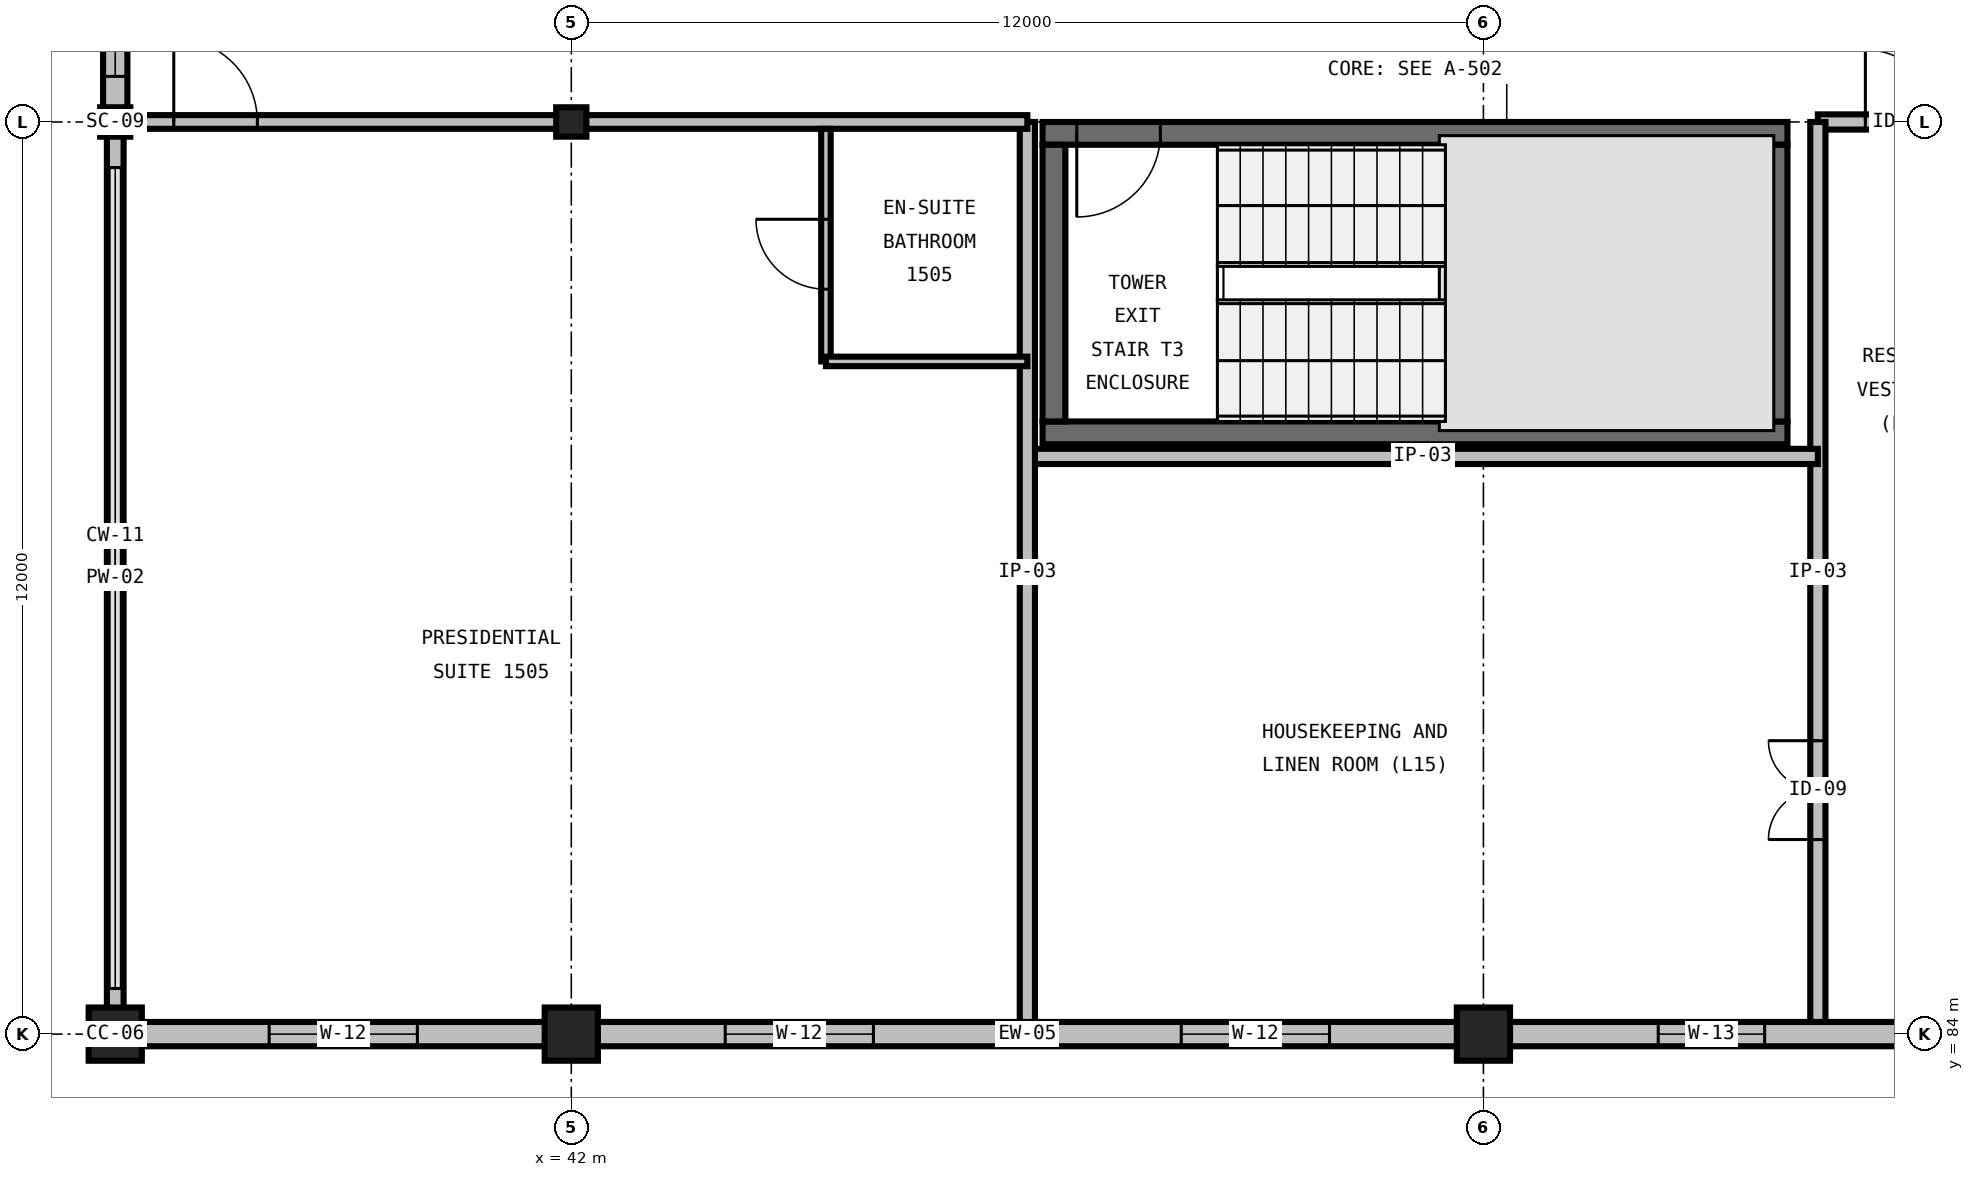
"""IFC4 building model, lengths in metres.
Left out: names, types, materials, properties, quantities, classifications, styles, units other than length and angle.
Written with IfcOpenShell. Run it as: python <this file> out.ifc"""

import sys

from ifc_helpers import new_model, si_unit, direction, frame, frame_2d, origin, origin_2d, place, context, subcontext, project, spatial, rectangle, i_section, extrude, element, fill, save


model = new_model("IFC4")
c1 = context("Model", 3, precision=1e-05, world=origin(), true_north=direction((0.0, 1.0)))
c2 = subcontext(c1, "Body", "Model", "MODEL_VIEW")
j1 = project(units=[si_unit("LENGTHUNIT", "METRE"), si_unit("PLANEANGLEUNIT", "RADIAN")], contexts=[c1])
p1 = place(None, origin())
s1 = spatial("IfcSite", under=j1, at=p1, CompositionType="ELEMENT")
p2 = place(p1, origin())
s2 = spatial("IfcBuilding", under=s1, at=p2, CompositionType="ELEMENT")
p3 = place(p2, frame((0.0, 0.0, 63.6)))
s3 = spatial("IfcBuildingStorey", under=s2, at=p3, CompositionType="ELEMENT", Elevation=63.6)
p4 = place(p3, frame((36.0, 84.0, 0.0), z_axis=(0.0, 0.0, 1.0), x_axis=(1.0, 0.0, 0.0)))
e1 = element("IfcColumn", 1, at=p4, inside=s3, PredefinedType="COLUMN", context=c2, shape_type="SweptSolid", body=[
    extrude(rectangle(XDim=0.7, YDim=0.7, at=origin_2d()), origin(), (0.0, 0.0, 1.0), 3.6),
])
p5 = place(p3, frame((36.0, 96.0, 0.0), z_axis=(0.0, 0.0, 1.0), x_axis=(1.0, 0.0, 0.0)))
e2 = element("IfcColumn", 2, at=p5, inside=s3, PredefinedType="COLUMN", context=c2, shape_type="SweptSolid", body=[
    extrude(i_section(OverallWidth=0.398, OverallDepth=0.387, WebThickness=0.021, FlangeThickness=0.033, FilletRadius=0.031, at=origin_2d()), origin(), (0.0, 0.0, 1.0), 3.6),
])
p6 = place(p3, frame((42.0, 84.0, 0.0), z_axis=(0.0, 0.0, 1.0), x_axis=(1.0, 0.0, 0.0)))
e3 = element("IfcColumn", 3, at=p6, inside=s3, PredefinedType="COLUMN", context=c2, shape_type="SweptSolid", body=[
    extrude(rectangle(XDim=0.7, YDim=0.7, at=origin_2d()), origin(), (0.0, 0.0, 1.0), 3.6),
])
p7 = place(p3, frame((42.0, 96.0, 0.0), z_axis=(0.0, 0.0, 1.0), x_axis=(1.0, 0.0, 0.0)))
e4 = element("IfcColumn", 4, at=p7, inside=s3, PredefinedType="COLUMN", context=c2, shape_type="SweptSolid", body=[
    extrude(i_section(OverallWidth=0.398, OverallDepth=0.387, WebThickness=0.021, FlangeThickness=0.033, FilletRadius=0.031, at=origin_2d()), origin(), (0.0, 0.0, 1.0), 3.6),
])
p8 = place(p3, frame((54.0, 84.0, 0.0), z_axis=(0.0, 0.0, 1.0), x_axis=(1.0, 0.0, 0.0)))
e5 = element("IfcColumn", 5, at=p8, inside=s3, PredefinedType="COLUMN", context=c2, shape_type="SweptSolid", body=[
    extrude(rectangle(XDim=0.7, YDim=0.7, at=origin_2d()), origin(), (0.0, 0.0, 1.0), 3.6),
])
p9 = place(p3, frame((48.2, 91.91, 0.0), z_axis=(0.0, 0.0, 1.0), x_axis=(1.0, 0.0, 0.0)))
e6 = element("IfcWall", 6, at=p9, inside=s3, PredefinedType="SHEAR", context=c2, shape_type="SweptSolid", body=[
    extrude(rectangle(XDim=9.8, YDim=0.3, at=frame_2d((4.9, 0.0))), origin(), (0.0, 0.0, 1.0), 3.6),
])
p10 = place(p3, frame((58.0, 95.85, 0.0), z_axis=(0.0, 0.0, 1.0), x_axis=(-1.0, 0.0, 0.0)))
e7 = element("IfcWall", 7, at=p10, inside=s3, PredefinedType="SHEAR", context=c2, shape_type="SweptSolid", body=[
    extrude(rectangle(XDim=9.8, YDim=0.3, at=frame_2d((4.9, 0.0))), origin(), (0.0, 0.0, 1.0), 3.6),
])
p11 = place(p10, frame((8.25, 0.0, 0.0)))
e8 = element("IfcOpeningElement", 8, at=p11, cuts=e7, PredefinedType="OPENING", context=c2, shape_type="SweptSolid", body=[
    extrude(rectangle(XDim=1.1, YDim=2.2, at=frame_2d((0.55, 1.1))), frame((0.0, 0.165, 0.0), z_axis=(0.0, -1.0, 0.0), x_axis=(1.0, 0.0, 0.0)), (0.0, 0.0, 1.0), 0.33),
])
for number, where, z_axis, x_axis in (
    (9, (48.35, 95.7, 0.0), (0.0, 0.0, 1.0), (0.0, -1.0, 0.0)),
    (10, (57.85, 92.06, 0.0), (0.0, 0.0, 1.0), (0.0, 1.0, 0.0)),
):
    element("IfcWall", number, at=place(p3, frame(where, z_axis=z_axis, x_axis=x_axis)), inside=s3, PredefinedType="SHEAR", context=c2, shape_type="SweptSolid", body=[
        extrude(rectangle(XDim=3.64, YDim=0.3, at=frame_2d((1.82, 0.0))), origin(), (0.0, 0.0, 1.0), 3.6),
    ])
p12 = place(p3, frame((36.0, 84.0, 0.0), z_axis=(0.0, 0.0, 1.0), x_axis=(1.0, 0.0, 0.0)))
e11 = element("IfcWall", 11, at=p12, inside=s3, PredefinedType="STANDARD", context=c2, shape_type="SweptSolid", body=[
    extrude(rectangle(XDim=6.0, YDim=0.32, at=frame_2d((3.0, 0.0))), origin(), (0.0, 0.0, 1.0), 2.536),
])
p13 = place(p12, frame((2.025, 0.0, 0.65)))
e12 = element("IfcOpeningElement", 12, at=p13, cuts=e11, PredefinedType="OPENING", context=c2, shape_type="SweptSolid", body=[
    extrude(rectangle(XDim=1.95, YDim=1.55, at=frame_2d((0.975, 0.775))), frame((0.0, 0.175, 0.0), z_axis=(0.0, -1.0, 0.0), x_axis=(1.0, 0.0, 0.0)), (0.0, 0.0, 1.0), 0.35),
])
p14 = place(p3, frame((42.0, 84.0, 0.0), z_axis=(0.0, 0.0, 1.0), x_axis=(1.0, 0.0, 0.0)))
e13 = element("IfcWall", 13, at=p14, inside=s3, PredefinedType="STANDARD", context=c2, shape_type="SweptSolid", body=[
    extrude(rectangle(XDim=12.0, YDim=0.32, at=frame_2d((6.0, 0.0))), origin(), (0.0, 0.0, 1.0), 2.536),
])
p15 = place(p14, frame((2.025, 0.0, 0.65)))
e14 = element("IfcOpeningElement", 14, at=p15, cuts=e13, PredefinedType="OPENING", context=c2, shape_type="SweptSolid", body=[
    extrude(rectangle(XDim=1.95, YDim=1.55, at=frame_2d((0.975, 0.775))), frame((0.0, 0.175, 0.0), z_axis=(0.0, -1.0, 0.0), x_axis=(1.0, 0.0, 0.0)), (0.0, 0.0, 1.0), 0.35),
])
p16 = place(p14, frame((8.025, 0.0, 0.65)))
e15 = element("IfcOpeningElement", 15, at=p16, cuts=e13, PredefinedType="OPENING", context=c2, shape_type="SweptSolid", body=[
    extrude(rectangle(XDim=1.95, YDim=1.55, at=frame_2d((0.975, 0.775))), frame((0.0, 0.175, 0.0), z_axis=(0.0, -1.0, 0.0), x_axis=(1.0, 0.0, 0.0)), (0.0, 0.0, 1.0), 0.35),
])
p17 = place(p3, frame((54.0, 84.0, 0.0), z_axis=(0.0, 0.0, 1.0), x_axis=(1.0, 0.0, 0.0)))
e16 = element("IfcWall", 16, at=p17, inside=s3, PredefinedType="STANDARD", context=c2, shape_type="SweptSolid", body=[
    extrude(rectangle(XDim=12.0, YDim=0.32, at=frame_2d((6.0, 0.0))), origin(), (0.0, 0.0, 1.0), 2.536),
])
p18 = place(p17, frame((2.3, 0.0, 1.0)))
e17 = element("IfcOpeningElement", 17, at=p18, cuts=e16, PredefinedType="OPENING", context=c2, shape_type="SweptSolid", body=[
    extrude(rectangle(XDim=1.4, YDim=1.4, at=frame_2d((0.7, 0.7))), frame((0.0, 0.175, 0.0), z_axis=(0.0, -1.0, 0.0), x_axis=(1.0, 0.0, 0.0)), (0.0, 0.0, 1.0), 0.35),
])
p19 = place(p17, frame((8.25, 0.0, 1.0)))
e18 = element("IfcOpeningElement", 18, at=p19, cuts=e16, PredefinedType="OPENING", context=c2, shape_type="SweptSolid", body=[
    extrude(rectangle(XDim=1.5, YDim=1.35, at=frame_2d((0.75, 0.675))), frame((0.0, 0.175, 0.0), z_axis=(0.0, -1.0, 0.0), x_axis=(1.0, 0.0, 0.0)), (0.0, 0.0, 1.0), 0.35),
])
p20 = place(p3, frame((36.0, 96.0, 0.0), z_axis=(0.0, 0.0, 1.0), x_axis=(0.0, -1.0, 0.0)))
e19 = element("IfcWall", 19, at=p20, inside=s3, PredefinedType="PARAPET", context=c2, shape_type="SweptSolid", body=[
    extrude(rectangle(XDim=12.0, YDim=0.22, at=frame_2d((6.0, 0.0))), origin(), (0.0, 0.0, 1.0), 0.2),
])
p21 = place(p3, frame((36.0, 105.0, 0.0), z_axis=(0.0, 0.0, 1.0), x_axis=(0.0, -1.0, 0.0)))
e20 = element("IfcWall", 20, at=p21, inside=s3, PredefinedType="STANDARD", context=c2, shape_type="SweptSolid", body=[
    extrude(rectangle(XDim=9.0, YDim=0.32, at=frame_2d((4.5, 0.0))), origin(), (0.0, 0.0, 1.0), 2.981),
])
p22 = place(p21, frame((6.6, 0.0, 0.85)))
e21 = element("IfcOpeningElement", 21, at=p22, cuts=e20, PredefinedType="OPENING", context=c2, shape_type="SweptSolid", body=[
    extrude(rectangle(XDim=1.8, YDim=1.5, at=frame_2d((0.9, 0.75))), frame((0.0, 0.175, 0.0), z_axis=(0.0, -1.0, 0.0), x_axis=(1.0, 0.0, 0.0)), (0.0, 0.0, 1.0), 0.35),
])
p23 = place(p3, frame((58.4, 96.0, 0.0), z_axis=(0.0, 0.0, 1.0), x_axis=(1.0, 0.0, 0.0)))
e22 = element("IfcWall", 22, at=p23, inside=s3, PredefinedType="PARTITIONING", context=c2, shape_type="SweptSolid", body=[
    extrude(rectangle(XDim=2.4, YDim=0.2, at=frame_2d((1.2, 0.0))), origin(), (0.0, 0.0, 1.0), 2.359),
])
p24 = place(p23, frame((0.625, 0.0, 0.0)))
e23 = element("IfcOpeningElement", 23, at=p24, cuts=e22, PredefinedType="OPENING", context=c2, shape_type="SweptSolid", body=[
    extrude(rectangle(XDim=0.95, YDim=2.15, at=frame_2d((0.475, 1.075))), frame((0.0, 0.115, 0.0), z_axis=(0.0, -1.0, 0.0), x_axis=(1.0, 0.0, 0.0)), (0.0, 0.0, 1.0), 0.23),
])
p25 = place(p3, frame((58.4, 84.16, 0.0), z_axis=(0.0, 0.0, 1.0), x_axis=(0.0, 1.0, 0.0)))
e24 = element("IfcWall", 24, at=p25, inside=s3, PredefinedType="PARTITIONING", context=c2, shape_type="SweptSolid", body=[
    extrude(rectangle(XDim=11.84, YDim=0.2, at=frame_2d((5.92, 0.0))), origin(), (0.0, 0.0, 1.0), 3.29),
])
p26 = place(p25, frame((2.4, 0.0, 0.0)))
e25 = element("IfcOpeningElement", 25, at=p26, cuts=e24, PredefinedType="OPENING", context=c2, shape_type="SweptSolid", body=[
    extrude(rectangle(XDim=1.3, YDim=2.2, at=frame_2d((0.65, 1.1))), frame((0.0, 0.115, 0.0), z_axis=(0.0, -1.0, 0.0), x_axis=(1.0, 0.0, 0.0)), (0.0, 0.0, 1.0), 0.23),
])
p27 = place(p3, frame((48.0, 91.6, 0.0), z_axis=(0.0, 0.0, 1.0), x_axis=(1.0, 0.0, 0.0)))
e26 = element("IfcWall", 26, at=p27, inside=s3, PredefinedType="PARTITIONING", context=c2, shape_type="SweptSolid", body=[
    extrude(rectangle(XDim=10.4, YDim=0.2, at=frame_2d((5.2, 0.0))), origin(), (0.0, 0.0, 1.0), 3.29),
])
p28 = place(p3, frame((48.0, 84.16, 0.0), z_axis=(0.0, 0.0, 1.0), x_axis=(0.0, 1.0, 0.0)))
e27 = element("IfcWall", 27, at=p28, inside=s3, PredefinedType="PARTITIONING", context=c2, shape_type="SweptSolid", body=[
    extrude(rectangle(XDim=11.84, YDim=0.2, at=frame_2d((5.92, 0.0))), origin(), (0.0, 0.0, 1.0), 3.29),
])
p29 = place(p3, frame((36.085, 96.0, 0.0), z_axis=(0.0, 0.0, 1.0), x_axis=(1.0, 0.0, 0.0)))
e28 = element("IfcWall", 28, at=p29, inside=s3, PredefinedType="PARTITIONING", context=c2, shape_type="SweptSolid", body=[
    extrude(rectangle(XDim=11.915, YDim=0.18, at=frame_2d((5.957, 0.0))), origin(), (0.0, 0.0, 1.0), 2.359),
])
p30 = place(p29, frame((0.685, 0.0, 0.0)))
e29 = element("IfcOpeningElement", 29, at=p30, cuts=e28, PredefinedType="OPENING", context=c2, shape_type="SweptSolid", body=[
    extrude(rectangle(XDim=1.1, YDim=2.2, at=frame_2d((0.55, 1.1))), frame((0.0, 0.105, 0.0), z_axis=(0.0, -1.0, 0.0), x_axis=(1.0, 0.0, 0.0)), (0.0, 0.0, 1.0), 0.21),
])
p31 = place(p3, frame((45.35, 92.85, 0.0), z_axis=(0.0, 0.0, 1.0), x_axis=(0.0, 1.0, 0.0)))
e30 = element("IfcWall", 30, at=p31, inside=s3, PredefinedType="PARTITIONING", context=c2, shape_type="SweptSolid", body=[
    extrude(rectangle(XDim=3.06, YDim=0.125, at=frame_2d((1.53, 0.0))), origin(), (0.0, 0.0, 1.0), 3.29),
])
p32 = place(p31, frame((0.95, 0.0, 0.0)))
e31 = element("IfcOpeningElement", 31, at=p32, cuts=e30, PredefinedType="OPENING", context=c2, shape_type="SweptSolid", body=[
    extrude(rectangle(XDim=0.92, YDim=2.1, at=frame_2d((0.46, 1.05))), frame((0.0, 0.077, 0.0), z_axis=(0.0, -1.0, 0.0), x_axis=(1.0, 0.0, 0.0)), (0.0, 0.0, 1.0), 0.155),
])
p33 = place(p3, frame((45.35, 92.85, 0.0), z_axis=(0.0, 0.0, 1.0), x_axis=(1.0, 0.0, 0.0)))
e32 = element("IfcWall", 32, at=p33, inside=s3, PredefinedType="PARTITIONING", context=c2, shape_type="SweptSolid", body=[
    extrude(rectangle(XDim=2.65, YDim=0.125, at=frame_2d((1.325, 0.0))), origin(), (0.0, 0.0, 1.0), 3.29),
])
p34 = place(p11, origin())
e33 = element("IfcDoor", 33, at=p34, inside=s3, OperationType="SINGLE_SWING_RIGHT", PredefinedType="DOOR", context=c2, shape_type="SweptSolid", body=[
    extrude(rectangle(XDim=1.1, YDim=2.2, at=frame_2d((0.55, 1.1))), frame((0.0, 0.025, 0.0), z_axis=(0.0, -1.0, 0.0), x_axis=(1.0, 0.0, 0.0)), (0.0, 0.0, 1.0), 0.05),
])
fill(e8, e33)
p35 = place(p13, origin())
e34 = element("IfcWindow", 34, at=p35, inside=s3, PartitioningType="DOUBLE_PANEL_VERTICAL", PredefinedType="WINDOW", context=c2, shape_type="SweptSolid", body=[
    extrude(rectangle(XDim=1.95, YDim=1.55, at=frame_2d((0.975, 0.775))), frame((0.0, 0.03, 0.0), z_axis=(0.0, -1.0, 0.0), x_axis=(1.0, 0.0, 0.0)), (0.0, 0.0, 1.0), 0.06),
])
fill(e12, e34)
p36 = place(p15, origin())
e35 = element("IfcWindow", 35, at=p36, inside=s3, PartitioningType="DOUBLE_PANEL_VERTICAL", PredefinedType="WINDOW", context=c2, shape_type="SweptSolid", body=[
    extrude(rectangle(XDim=1.95, YDim=1.55, at=frame_2d((0.975, 0.775))), frame((0.0, 0.03, 0.0), z_axis=(0.0, -1.0, 0.0), x_axis=(1.0, 0.0, 0.0)), (0.0, 0.0, 1.0), 0.06),
])
fill(e14, e35)
p37 = place(p16, origin())
e36 = element("IfcWindow", 36, at=p37, inside=s3, PartitioningType="DOUBLE_PANEL_VERTICAL", PredefinedType="WINDOW", context=c2, shape_type="SweptSolid", body=[
    extrude(rectangle(XDim=1.95, YDim=1.55, at=frame_2d((0.975, 0.775))), frame((0.0, 0.03, 0.0), z_axis=(0.0, -1.0, 0.0), x_axis=(1.0, 0.0, 0.0)), (0.0, 0.0, 1.0), 0.06),
])
fill(e15, e36)
p38 = place(p18, origin())
e37 = element("IfcWindow", 37, at=p38, inside=s3, PartitioningType="SINGLE_PANEL", PredefinedType="WINDOW", context=c2, shape_type="SweptSolid", body=[
    extrude(rectangle(XDim=1.4, YDim=1.4, at=frame_2d((0.7, 0.7))), frame((0.0, 0.03, 0.0), z_axis=(0.0, -1.0, 0.0), x_axis=(1.0, 0.0, 0.0)), (0.0, 0.0, 1.0), 0.06),
])
fill(e17, e37)
p39 = place(p22, origin())
e38 = element("IfcWindow", 38, at=p39, inside=s3, PartitioningType="SINGLE_PANEL", PredefinedType="WINDOW", context=c2, shape_type="SweptSolid", body=[
    extrude(rectangle(XDim=1.8, YDim=1.5, at=frame_2d((0.9, 0.75))), frame((0.0, 0.03, 0.0), z_axis=(0.0, -1.0, 0.0), x_axis=(1.0, 0.0, 0.0)), (0.0, 0.0, 1.0), 0.06),
])
fill(e21, e38)
p40 = place(p24, origin())
e39 = element("IfcDoor", 39, at=p40, inside=s3, OperationType="SINGLE_SWING_LEFT", PredefinedType="DOOR", context=c2, shape_type="SweptSolid", body=[
    extrude(rectangle(XDim=0.95, YDim=2.15, at=frame_2d((0.475, 1.075))), frame((0.0, 0.025, 0.0), z_axis=(0.0, -1.0, 0.0), x_axis=(1.0, 0.0, 0.0)), (0.0, 0.0, 1.0), 0.05),
])
fill(e23, e39)
p41 = place(p26, origin())
e40 = element("IfcDoor", 40, at=p41, inside=s3, OperationType="DOUBLE_DOOR_SINGLE_SWING", PredefinedType="DOOR", context=c2, shape_type="SweptSolid", body=[
    extrude(rectangle(XDim=1.3, YDim=2.2, at=frame_2d((0.65, 1.1))), frame((0.0, 0.025, 0.0), z_axis=(0.0, -1.0, 0.0), x_axis=(1.0, 0.0, 0.0)), (0.0, 0.0, 1.0), 0.05),
])
fill(e25, e40)
p42 = place(p30, origin())
e41 = element("IfcDoor", 41, at=p42, inside=s3, OperationType="SINGLE_SWING_LEFT", PredefinedType="DOOR", context=c2, shape_type="SweptSolid", body=[
    extrude(rectangle(XDim=1.1, YDim=2.2, at=frame_2d((0.55, 1.1))), frame((0.0, 0.025, 0.0), z_axis=(0.0, -1.0, 0.0), x_axis=(1.0, 0.0, 0.0)), (0.0, 0.0, 1.0), 0.05),
])
fill(e29, e41)
p43 = place(p32, origin())
e42 = element("IfcDoor", 42, at=p43, inside=s3, OperationType="SINGLE_SWING_RIGHT", PredefinedType="DOOR", context=c2, shape_type="SweptSolid", body=[
    extrude(rectangle(XDim=0.92, YDim=2.1, at=frame_2d((0.46, 1.05))), frame((0.0, 0.025, 0.0), z_axis=(0.0, -1.0, 0.0), x_axis=(1.0, 0.0, 0.0)), (0.0, 0.0, 1.0), 0.05),
])
fill(e31, e42)
save(model, sys.argv[1])
